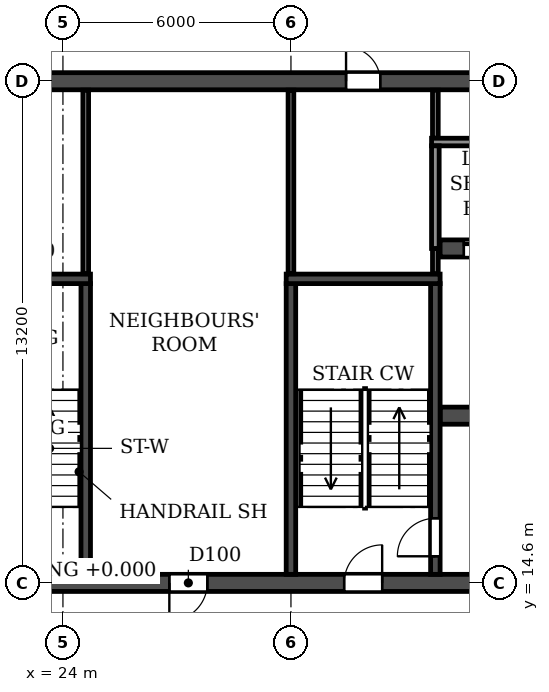
"""IFC4 building model, lengths in metres.
Left out: names, types, materials, properties, quantities, classifications, styles, units other than length and angle.
Written with IfcOpenShell. Run it as: python <this file> out.ifc"""

import sys

from ifc_helpers import new_model, si_unit, direction, frame, frame_2d, origin, place, context, subcontext, project, spatial, rectangle, extrude, element, fill, save


model = new_model("IFC4")
c1 = context("Model", 3, precision=1e-05, world=origin(), true_north=direction((0.0, 1.0)))
c2 = subcontext(c1, "Body", "Model", "MODEL_VIEW")
j1 = project(units=[si_unit("LENGTHUNIT", "METRE"), si_unit("PLANEANGLEUNIT", "RADIAN")], contexts=[c1])
p1 = place(None, origin())
s1 = spatial("IfcSite", under=j1, at=p1, CompositionType="ELEMENT")
p2 = place(p1, origin())
s2 = spatial("IfcBuilding", under=s1, at=p2, CompositionType="ELEMENT")
p3 = place(p2, frame((0.0, 0.0, 122.4)))
s3 = spatial("IfcBuildingStorey", under=s2, at=p3, CompositionType="ELEMENT", Elevation=122.4)
p4 = place(p3, frame((12.2, 14.6, 0.0), z_axis=(0.0, 0.0, 1.0), x_axis=(1.0, 0.0, 0.0)))
e1 = element("IfcWall", 1, at=p4, inside=s3, PredefinedType="SOLIDWALL", context=c2, shape_type="SweptSolid", body=[
    extrude(rectangle(XDim=77.6, YDim=0.45, at=frame_2d((38.8, 0.0))), origin(), (0.0, 0.0, 1.0), 3.07),
])
p5 = place(p4, frame((0.8, 0.0, 0.0)))
e2 = element("IfcOpeningElement", 2, at=p5, cuts=e1, PredefinedType="OPENING", context=c2, shape_type="SweptSolid", body=[
    extrude(rectangle(XDim=1.0, YDim=2.1, at=frame_2d((0.5, 1.05))), frame((0.0, 0.235, 0.0), z_axis=(0.0, -1.0, 0.0), x_axis=(1.0, 0.0, 0.0)), (0.0, 0.0, 1.0), 0.47),
])
p6 = place(p4, frame((3.8, 0.0, 0.0)))
e3 = element("IfcOpeningElement", 3, at=p6, cuts=e1, PredefinedType="OPENING", context=c2, shape_type="SweptSolid", body=[
    extrude(rectangle(XDim=1.0, YDim=2.1, at=frame_2d((0.5, 1.05))), frame((0.0, 0.235, 0.0), z_axis=(0.0, -1.0, 0.0), x_axis=(1.0, 0.0, 0.0)), (0.0, 0.0, 1.0), 0.47),
])
p7 = place(p4, frame((6.7, 0.0, 0.0)))
e4 = element("IfcOpeningElement", 4, at=p7, cuts=e1, PredefinedType="OPENING", context=c2, shape_type="SweptSolid", body=[
    extrude(rectangle(XDim=1.0, YDim=2.1, at=frame_2d((0.5, 1.05))), frame((0.0, 0.235, 0.0), z_axis=(0.0, -1.0, 0.0), x_axis=(1.0, 0.0, 0.0)), (0.0, 0.0, 1.0), 0.47),
])
p8 = place(p4, frame((14.6, 0.0, 0.0)))
e5 = element("IfcOpeningElement", 5, at=p8, cuts=e1, PredefinedType="OPENING", context=c2, shape_type="SweptSolid", body=[
    extrude(rectangle(XDim=1.0, YDim=2.1, at=frame_2d((0.5, 1.05))), frame((0.0, 0.235, 0.0), z_axis=(0.0, -1.0, 0.0), x_axis=(1.0, 0.0, 0.0)), (0.0, 0.0, 1.0), 0.47),
])
p9 = place(p4, frame((19.2, 0.0, 0.0)))
e6 = element("IfcOpeningElement", 6, at=p9, cuts=e1, PredefinedType="OPENING", context=c2, shape_type="SweptSolid", body=[
    extrude(rectangle(XDim=1.0, YDim=2.1, at=frame_2d((0.5, 1.05))), frame((0.0, 0.235, 0.0), z_axis=(0.0, -1.0, 0.0), x_axis=(1.0, 0.0, 0.0)), (0.0, 0.0, 1.0), 0.47),
])
p10 = place(p4, frame((30.5, 0.0, 0.0)))
e7 = element("IfcOpeningElement", 7, at=p10, cuts=e1, PredefinedType="OPENING", context=c2, shape_type="SweptSolid", body=[
    extrude(rectangle(XDim=1.0, YDim=2.1, at=frame_2d((0.5, 1.05))), frame((0.0, 0.235, 0.0), z_axis=(0.0, -1.0, 0.0), x_axis=(1.0, 0.0, 0.0)), (0.0, 0.0, 1.0), 0.47),
])
p11 = place(p4, frame((34.4, 0.0, 0.0)))
e8 = element("IfcOpeningElement", 8, at=p11, cuts=e1, PredefinedType="OPENING", context=c2, shape_type="SweptSolid", body=[
    extrude(rectangle(XDim=1.0, YDim=2.1, at=frame_2d((0.5, 1.05))), frame((0.0, 0.235, 0.0), z_axis=(0.0, -1.0, 0.0), x_axis=(1.0, 0.0, 0.0)), (0.0, 0.0, 1.0), 0.47),
])
p12 = place(p4, frame((38.3, 0.0, 0.0)))
e9 = element("IfcOpeningElement", 9, at=p12, cuts=e1, PredefinedType="OPENING", context=c2, shape_type="SweptSolid", body=[
    extrude(rectangle(XDim=1.0, YDim=2.1, at=frame_2d((0.5, 1.05))), frame((0.0, 0.235, 0.0), z_axis=(0.0, -1.0, 0.0), x_axis=(1.0, 0.0, 0.0)), (0.0, 0.0, 1.0), 0.47),
])
p13 = place(p4, frame((40.9, 0.0, 0.0)))
e10 = element("IfcOpeningElement", 10, at=p13, cuts=e1, PredefinedType="OPENING", context=c2, shape_type="SweptSolid", body=[
    extrude(rectangle(XDim=1.0, YDim=2.1, at=frame_2d((0.5, 1.05))), frame((0.0, 0.235, 0.0), z_axis=(0.0, -1.0, 0.0), x_axis=(1.0, 0.0, 0.0)), (0.0, 0.0, 1.0), 0.47),
])
p14 = place(p4, frame((44.8, 0.0, 0.0)))
e11 = element("IfcOpeningElement", 11, at=p14, cuts=e1, PredefinedType="OPENING", context=c2, shape_type="SweptSolid", body=[
    extrude(rectangle(XDim=1.0, YDim=2.1, at=frame_2d((0.5, 1.05))), frame((0.0, 0.235, 0.0), z_axis=(0.0, -1.0, 0.0), x_axis=(1.0, 0.0, 0.0)), (0.0, 0.0, 1.0), 0.47),
])
p15 = place(p4, frame((57.4, 0.0, 0.0)))
e12 = element("IfcOpeningElement", 12, at=p15, cuts=e1, PredefinedType="OPENING", context=c2, shape_type="SweptSolid", body=[
    extrude(rectangle(XDim=1.0, YDim=2.1, at=frame_2d((0.5, 1.05))), frame((0.0, 0.235, 0.0), z_axis=(0.0, -1.0, 0.0), x_axis=(1.0, 0.0, 0.0)), (0.0, 0.0, 1.0), 0.47),
])
p16 = place(p4, frame((62.0, 0.0, 0.0)))
e13 = element("IfcOpeningElement", 13, at=p16, cuts=e1, PredefinedType="OPENING", context=c2, shape_type="SweptSolid", body=[
    extrude(rectangle(XDim=1.0, YDim=2.1, at=frame_2d((0.5, 1.05))), frame((0.0, 0.235, 0.0), z_axis=(0.0, -1.0, 0.0), x_axis=(1.0, 0.0, 0.0)), (0.0, 0.0, 1.0), 0.47),
])
p17 = place(p4, frame((69.9, 0.0, 0.0)))
e14 = element("IfcOpeningElement", 14, at=p17, cuts=e1, PredefinedType="OPENING", context=c2, shape_type="SweptSolid", body=[
    extrude(rectangle(XDim=1.0, YDim=2.1, at=frame_2d((0.5, 1.05))), frame((0.0, 0.235, 0.0), z_axis=(0.0, -1.0, 0.0), x_axis=(1.0, 0.0, 0.0)), (0.0, 0.0, 1.0), 0.47),
])
p18 = place(p4, frame((72.8, 0.0, 0.0)))
e15 = element("IfcOpeningElement", 15, at=p18, cuts=e1, PredefinedType="OPENING", context=c2, shape_type="SweptSolid", body=[
    extrude(rectangle(XDim=1.0, YDim=2.1, at=frame_2d((0.5, 1.05))), frame((0.0, 0.235, 0.0), z_axis=(0.0, -1.0, 0.0), x_axis=(1.0, 0.0, 0.0)), (0.0, 0.0, 1.0), 0.47),
])
p19 = place(p4, frame((75.8, 0.0, 0.0)))
e16 = element("IfcOpeningElement", 16, at=p19, cuts=e1, PredefinedType="OPENING", context=c2, shape_type="SweptSolid", body=[
    extrude(rectangle(XDim=1.0, YDim=2.1, at=frame_2d((0.5, 1.05))), frame((0.0, 0.235, 0.0), z_axis=(0.0, -1.0, 0.0), x_axis=(1.0, 0.0, 0.0)), (0.0, 0.0, 1.0), 0.47),
])
p20 = place(p3, frame((12.2, 27.8, 0.0), z_axis=(0.0, 0.0, 1.0), x_axis=(1.0, 0.0, 0.0)))
e17 = element("IfcWall", 17, at=p20, inside=s3, PredefinedType="SOLIDWALL", context=c2, shape_type="SweptSolid", body=[
    extrude(rectangle(XDim=77.6, YDim=0.45, at=frame_2d((38.8, 0.0))), origin(), (0.0, 0.0, 1.0), 3.07),
])
p21 = place(p20, frame((0.8, 0.0, 0.0)))
e18 = element("IfcOpeningElement", 18, at=p21, cuts=e17, PredefinedType="OPENING", context=c2, shape_type="SweptSolid", body=[
    extrude(rectangle(XDim=1.0, YDim=2.1, at=frame_2d((0.5, 1.05))), frame((0.0, 0.235, 0.0), z_axis=(0.0, -1.0, 0.0), x_axis=(1.0, 0.0, 0.0)), (0.0, 0.0, 1.0), 0.47),
])
p22 = place(p20, frame((3.8, 0.0, 0.0)))
e19 = element("IfcOpeningElement", 19, at=p22, cuts=e17, PredefinedType="OPENING", context=c2, shape_type="SweptSolid", body=[
    extrude(rectangle(XDim=1.0, YDim=2.1, at=frame_2d((0.5, 1.05))), frame((0.0, 0.235, 0.0), z_axis=(0.0, -1.0, 0.0), x_axis=(1.0, 0.0, 0.0)), (0.0, 0.0, 1.0), 0.47),
])
p23 = place(p20, frame((6.7, 0.0, 0.0)))
e20 = element("IfcOpeningElement", 20, at=p23, cuts=e17, PredefinedType="OPENING", context=c2, shape_type="SweptSolid", body=[
    extrude(rectangle(XDim=1.0, YDim=2.1, at=frame_2d((0.5, 1.05))), frame((0.0, 0.235, 0.0), z_axis=(0.0, -1.0, 0.0), x_axis=(1.0, 0.0, 0.0)), (0.0, 0.0, 1.0), 0.47),
])
p24 = place(p20, frame((10.05, 0.0, 0.0)))
e21 = element("IfcOpeningElement", 21, at=p24, cuts=e17, PredefinedType="OPENING", context=c2, shape_type="SweptSolid", body=[
    extrude(rectangle(XDim=0.9, YDim=2.1, at=frame_2d((0.45, 1.05))), frame((0.0, 0.235, 0.0), z_axis=(0.0, -1.0, 0.0), x_axis=(1.0, 0.0, 0.0)), (0.0, 0.0, 1.0), 0.47),
])
p25 = place(p20, frame((19.25, 0.0, 0.0)))
e22 = element("IfcOpeningElement", 22, at=p25, cuts=e17, PredefinedType="OPENING", context=c2, shape_type="SweptSolid", body=[
    extrude(rectangle(XDim=0.9, YDim=2.1, at=frame_2d((0.45, 1.05))), frame((0.0, 0.235, 0.0), z_axis=(0.0, -1.0, 0.0), x_axis=(1.0, 0.0, 0.0)), (0.0, 0.0, 1.0), 0.47),
])
p26 = place(p20, frame((25.0, 0.0, 0.0)))
e23 = element("IfcOpeningElement", 23, at=p26, cuts=e17, PredefinedType="OPENING", context=c2, shape_type="SweptSolid", body=[
    extrude(rectangle(XDim=1.0, YDim=2.1, at=frame_2d((0.5, 1.05))), frame((0.0, 0.235, 0.0), z_axis=(0.0, -1.0, 0.0), x_axis=(1.0, 0.0, 0.0)), (0.0, 0.0, 1.0), 0.47),
])
p27 = place(p20, frame((30.2, 0.0, 0.0)))
e24 = element("IfcOpeningElement", 24, at=p27, cuts=e17, PredefinedType="OPENING", context=c2, shape_type="SweptSolid", body=[
    extrude(rectangle(XDim=1.0, YDim=2.1, at=frame_2d((0.5, 1.05))), frame((0.0, 0.235, 0.0), z_axis=(0.0, -1.0, 0.0), x_axis=(1.0, 0.0, 0.0)), (0.0, 0.0, 1.0), 0.47),
])
p28 = place(p20, frame((35.4, 0.0, 0.0)))
e25 = element("IfcOpeningElement", 25, at=p28, cuts=e17, PredefinedType="OPENING", context=c2, shape_type="SweptSolid", body=[
    extrude(rectangle(XDim=1.0, YDim=2.1, at=frame_2d((0.5, 1.05))), frame((0.0, 0.235, 0.0), z_axis=(0.0, -1.0, 0.0), x_axis=(1.0, 0.0, 0.0)), (0.0, 0.0, 1.0), 0.47),
])
p29 = place(p20, frame((38.3, 0.0, 0.0)))
e26 = element("IfcOpeningElement", 26, at=p29, cuts=e17, PredefinedType="OPENING", context=c2, shape_type="SweptSolid", body=[
    extrude(rectangle(XDim=1.0, YDim=2.1, at=frame_2d((0.5, 1.05))), frame((0.0, 0.235, 0.0), z_axis=(0.0, -1.0, 0.0), x_axis=(1.0, 0.0, 0.0)), (0.0, 0.0, 1.0), 0.47),
])
p30 = place(p20, frame((41.2, 0.0, 0.0)))
e27 = element("IfcOpeningElement", 27, at=p30, cuts=e17, PredefinedType="OPENING", context=c2, shape_type="SweptSolid", body=[
    extrude(rectangle(XDim=1.0, YDim=2.1, at=frame_2d((0.5, 1.05))), frame((0.0, 0.235, 0.0), z_axis=(0.0, -1.0, 0.0), x_axis=(1.0, 0.0, 0.0)), (0.0, 0.0, 1.0), 0.47),
])
p31 = place(p20, frame((46.4, 0.0, 0.0)))
e28 = element("IfcOpeningElement", 28, at=p31, cuts=e17, PredefinedType="OPENING", context=c2, shape_type="SweptSolid", body=[
    extrude(rectangle(XDim=1.0, YDim=2.1, at=frame_2d((0.5, 1.05))), frame((0.0, 0.235, 0.0), z_axis=(0.0, -1.0, 0.0), x_axis=(1.0, 0.0, 0.0)), (0.0, 0.0, 1.0), 0.47),
])
p32 = place(p20, frame((51.6, 0.0, 0.0)))
e29 = element("IfcOpeningElement", 29, at=p32, cuts=e17, PredefinedType="OPENING", context=c2, shape_type="SweptSolid", body=[
    extrude(rectangle(XDim=1.0, YDim=2.1, at=frame_2d((0.5, 1.05))), frame((0.0, 0.235, 0.0), z_axis=(0.0, -1.0, 0.0), x_axis=(1.0, 0.0, 0.0)), (0.0, 0.0, 1.0), 0.47),
])
p33 = place(p20, frame((54.2, 0.0, 0.0)))
e30 = element("IfcOpeningElement", 30, at=p33, cuts=e17, PredefinedType="OPENING", context=c2, shape_type="SweptSolid", body=[
    extrude(rectangle(XDim=1.0, YDim=2.1, at=frame_2d((0.5, 1.05))), frame((0.0, 0.235, 0.0), z_axis=(0.0, -1.0, 0.0), x_axis=(1.0, 0.0, 0.0)), (0.0, 0.0, 1.0), 0.47),
])
p34 = place(p20, frame((57.45, 0.0, 0.0)))
e31 = element("IfcOpeningElement", 31, at=p34, cuts=e17, PredefinedType="OPENING", context=c2, shape_type="SweptSolid", body=[
    extrude(rectangle(XDim=0.9, YDim=2.1, at=frame_2d((0.45, 1.05))), frame((0.0, 0.235, 0.0), z_axis=(0.0, -1.0, 0.0), x_axis=(1.0, 0.0, 0.0)), (0.0, 0.0, 1.0), 0.47),
])
p35 = place(p20, frame((66.65, 0.0, 0.0)))
e32 = element("IfcOpeningElement", 32, at=p35, cuts=e17, PredefinedType="OPENING", context=c2, shape_type="SweptSolid", body=[
    extrude(rectangle(XDim=0.9, YDim=2.1, at=frame_2d((0.45, 1.05))), frame((0.0, 0.235, 0.0), z_axis=(0.0, -1.0, 0.0), x_axis=(1.0, 0.0, 0.0)), (0.0, 0.0, 1.0), 0.47),
])
p36 = place(p20, frame((69.9, 0.0, 0.0)))
e33 = element("IfcOpeningElement", 33, at=p36, cuts=e17, PredefinedType="OPENING", context=c2, shape_type="SweptSolid", body=[
    extrude(rectangle(XDim=1.0, YDim=2.1, at=frame_2d((0.5, 1.05))), frame((0.0, 0.235, 0.0), z_axis=(0.0, -1.0, 0.0), x_axis=(1.0, 0.0, 0.0)), (0.0, 0.0, 1.0), 0.47),
])
p37 = place(p20, frame((72.8, 0.0, 0.0)))
e34 = element("IfcOpeningElement", 34, at=p37, cuts=e17, PredefinedType="OPENING", context=c2, shape_type="SweptSolid", body=[
    extrude(rectangle(XDim=1.0, YDim=2.1, at=frame_2d((0.5, 1.05))), frame((0.0, 0.235, 0.0), z_axis=(0.0, -1.0, 0.0), x_axis=(1.0, 0.0, 0.0)), (0.0, 0.0, 1.0), 0.47),
])
p38 = place(p20, frame((75.8, 0.0, 0.0)))
e35 = element("IfcOpeningElement", 35, at=p38, cuts=e17, PredefinedType="OPENING", context=c2, shape_type="SweptSolid", body=[
    extrude(rectangle(XDim=1.0, YDim=2.1, at=frame_2d((0.5, 1.05))), frame((0.0, 0.235, 0.0), z_axis=(0.0, -1.0, 0.0), x_axis=(1.0, 0.0, 0.0)), (0.0, 0.0, 1.0), 0.47),
])
p39 = place(p3, frame((33.925, 19.0, 0.0), z_axis=(0.0, 0.0, 1.0), x_axis=(1.0, 0.0, 0.0)))
e36 = element("IfcWall", 36, at=p39, inside=s3, PredefinedType="SOLIDWALL", context=c2, shape_type="SweptSolid", body=[
    extrude(rectangle(XDim=34.15, YDim=0.45, at=frame_2d((17.075, 0.0))), origin(), (0.0, 0.0, 1.0), 3.07),
])
p40 = place(p39, frame((16.175, 0.0, 0.0)))
e37 = element("IfcOpeningElement", 37, at=p40, cuts=e36, PredefinedType="OPENING", context=c2, shape_type="SweptSolid", body=[
    extrude(rectangle(XDim=1.8, YDim=2.1, at=frame_2d((0.9, 1.05))), frame((0.0, 0.235, 0.0), z_axis=(0.0, -1.0, 0.0), x_axis=(1.0, 0.0, 0.0)), (0.0, 0.0, 1.0), 0.47),
])
p41 = place(p39, frame((1.525, 0.0, 0.0)))
e38 = element("IfcOpeningElement", 38, at=p41, cuts=e36, PredefinedType="OPENING", context=c2, shape_type="SweptSolid", body=[
    extrude(rectangle(XDim=1.8, YDim=2.1, at=frame_2d((0.9, 1.05))), frame((0.0, 0.235, 0.0), z_axis=(0.0, -1.0, 0.0), x_axis=(1.0, 0.0, 0.0)), (0.0, 0.0, 1.0), 0.47),
])
p42 = place(p39, frame((30.825, 0.0, 0.0)))
e39 = element("IfcOpeningElement", 39, at=p42, cuts=e36, PredefinedType="OPENING", context=c2, shape_type="SweptSolid", body=[
    extrude(rectangle(XDim=1.8, YDim=2.1, at=frame_2d((0.9, 1.05))), frame((0.0, 0.235, 0.0), z_axis=(0.0, -1.0, 0.0), x_axis=(1.0, 0.0, 0.0)), (0.0, 0.0, 1.0), 0.47),
])
p43 = place(p3, frame((33.925, 23.4, 0.0), z_axis=(0.0, 0.0, 1.0), x_axis=(1.0, 0.0, 0.0)))
e40 = element("IfcWall", 40, at=p43, inside=s3, PredefinedType="SOLIDWALL", context=c2, shape_type="SweptSolid", body=[
    extrude(rectangle(XDim=34.15, YDim=0.45, at=frame_2d((17.075, 0.0))), origin(), (0.0, 0.0, 1.0), 3.07),
])
p44 = place(p43, frame((16.175, 0.0, 0.0)))
e41 = element("IfcOpeningElement", 41, at=p44, cuts=e40, PredefinedType="OPENING", context=c2, shape_type="SweptSolid", body=[
    extrude(rectangle(XDim=1.8, YDim=2.1, at=frame_2d((0.9, 1.05))), frame((0.0, 0.235, 0.0), z_axis=(0.0, -1.0, 0.0), x_axis=(1.0, 0.0, 0.0)), (0.0, 0.0, 1.0), 0.47),
])
p45 = place(p43, frame((0.625, 0.0, 0.0)))
e42 = element("IfcOpeningElement", 42, at=p45, cuts=e40, PredefinedType="OPENING", context=c2, shape_type="SweptSolid", body=[
    extrude(rectangle(XDim=1.1, YDim=2.1, at=frame_2d((0.55, 1.05))), frame((0.0, 0.235, 0.0), z_axis=(0.0, -1.0, 0.0), x_axis=(1.0, 0.0, 0.0)), (0.0, 0.0, 1.0), 0.47),
])
p46 = place(p43, frame((3.225, 0.0, 0.0)))
e43 = element("IfcOpeningElement", 43, at=p46, cuts=e40, PredefinedType="OPENING", context=c2, shape_type="SweptSolid", body=[
    extrude(rectangle(XDim=1.1, YDim=2.1, at=frame_2d((0.55, 1.05))), frame((0.0, 0.235, 0.0), z_axis=(0.0, -1.0, 0.0), x_axis=(1.0, 0.0, 0.0)), (0.0, 0.0, 1.0), 0.47),
])
p47 = place(p43, frame((5.825, 0.0, 0.0)))
e44 = element("IfcOpeningElement", 44, at=p47, cuts=e40, PredefinedType="OPENING", context=c2, shape_type="SweptSolid", body=[
    extrude(rectangle(XDim=1.1, YDim=2.1, at=frame_2d((0.55, 1.05))), frame((0.0, 0.235, 0.0), z_axis=(0.0, -1.0, 0.0), x_axis=(1.0, 0.0, 0.0)), (0.0, 0.0, 1.0), 0.47),
])
p48 = place(p43, frame((8.425, 0.0, 0.0)))
e45 = element("IfcOpeningElement", 45, at=p48, cuts=e40, PredefinedType="OPENING", context=c2, shape_type="SweptSolid", body=[
    extrude(rectangle(XDim=1.1, YDim=2.1, at=frame_2d((0.55, 1.05))), frame((0.0, 0.235, 0.0), z_axis=(0.0, -1.0, 0.0), x_axis=(1.0, 0.0, 0.0)), (0.0, 0.0, 1.0), 0.47),
])
p49 = place(p43, frame((11.025, 0.0, 0.0)))
e46 = element("IfcOpeningElement", 46, at=p49, cuts=e40, PredefinedType="OPENING", context=c2, shape_type="SweptSolid", body=[
    extrude(rectangle(XDim=1.1, YDim=2.1, at=frame_2d((0.55, 1.05))), frame((0.0, 0.235, 0.0), z_axis=(0.0, -1.0, 0.0), x_axis=(1.0, 0.0, 0.0)), (0.0, 0.0, 1.0), 0.47),
])
p50 = place(p43, frame((13.625, 0.0, 0.0)))
e47 = element("IfcOpeningElement", 47, at=p50, cuts=e40, PredefinedType="OPENING", context=c2, shape_type="SweptSolid", body=[
    extrude(rectangle(XDim=1.1, YDim=2.1, at=frame_2d((0.55, 1.05))), frame((0.0, 0.235, 0.0), z_axis=(0.0, -1.0, 0.0), x_axis=(1.0, 0.0, 0.0)), (0.0, 0.0, 1.0), 0.47),
])
p51 = place(p43, frame((27.225, 0.0, 0.0)))
e48 = element("IfcOpeningElement", 48, at=p51, cuts=e40, PredefinedType="OPENING", context=c2, shape_type="SweptSolid", body=[
    extrude(rectangle(XDim=1.1, YDim=2.1, at=frame_2d((0.55, 1.05))), frame((0.0, 0.235, 0.0), z_axis=(0.0, -1.0, 0.0), x_axis=(1.0, 0.0, 0.0)), (0.0, 0.0, 1.0), 0.47),
])
p52 = place(p3, frame((30.0, 14.825, 0.0), z_axis=(0.0, 0.0, 1.0), x_axis=(0.0, 1.0, 0.0)))
e49 = element("IfcWall", 49, at=p52, inside=s3, PredefinedType="SOLIDWALL", context=c2, shape_type="SweptSolid", body=[
    extrude(rectangle(XDim=7.65, YDim=0.25, at=frame_2d((3.825, 0.0))), origin(), (0.0, 0.0, 1.0), 3.07),
])
p53 = place(p3, frame((33.8, 14.825, 0.0), z_axis=(0.0, 0.0, 1.0), x_axis=(0.0, 1.0, 0.0)))
e50 = element("IfcWall", 50, at=p53, inside=s3, PredefinedType="SOLIDWALL", context=c2, shape_type="SweptSolid", body=[
    extrude(rectangle(XDim=7.65, YDim=0.25, at=frame_2d((3.825, 0.0))), origin(), (0.0, 0.0, 1.0), 3.07),
])
p54 = place(p53, frame((0.475, 0.0, 0.0)))
e51 = element("IfcOpeningElement", 51, at=p54, cuts=e50, PredefinedType="OPENING", context=c2, shape_type="SweptSolid", body=[
    extrude(rectangle(XDim=1.0, YDim=2.1, at=frame_2d((0.5, 1.05))), frame((0.0, 0.135, 0.0), z_axis=(0.0, -1.0, 0.0), x_axis=(1.0, 0.0, 0.0)), (0.0, 0.0, 1.0), 0.27),
])
p55 = place(p3, frame((29.875, 22.6, 0.0), z_axis=(0.0, 0.0, 1.0), x_axis=(1.0, 0.0, 0.0)))
e52 = element("IfcWall", 52, at=p55, inside=s3, PredefinedType="SOLIDWALL", context=c2, shape_type="SweptSolid", body=[
    extrude(rectangle(XDim=4.05, YDim=0.25, at=frame_2d((2.025, 0.0))), origin(), (0.0, 0.0, 1.0), 3.07),
])
p56 = place(p3, frame((24.6, 14.825, 0.0), z_axis=(0.0, 0.0, 1.0), x_axis=(0.0, 1.0, 0.0)))
e53 = element("IfcWall", 53, at=p56, inside=s3, PredefinedType="SOLIDWALL", context=c2, shape_type="SweptSolid", body=[
    extrude(rectangle(XDim=7.65, YDim=0.25, at=frame_2d((3.825, 0.0))), origin(), (0.0, 0.0, 1.0), 3.07),
])
p57 = place(p3, frame((20.675, 22.6, 0.0), z_axis=(0.0, 0.0, 1.0), x_axis=(1.0, 0.0, 0.0)))
e54 = element("IfcWall", 54, at=p57, inside=s3, PredefinedType="SOLIDWALL", context=c2, shape_type="SweptSolid", body=[
    extrude(rectangle(XDim=4.05, YDim=0.25, at=frame_2d((2.025, 0.0))), origin(), (0.0, 0.0, 1.0), 3.07),
])
for number, where, z_axis, x_axis in (
    (55, (24.6, 22.735, 0.0), (0.0, 0.0, 1.0), (0.0, 1.0, 0.0)),
    (56, (30.0, 22.735, 0.0), (0.0, 0.0, 1.0), (0.0, 1.0, 0.0)),
):
    element("IfcWall", number, at=place(p3, frame(where, z_axis=z_axis, x_axis=x_axis)), inside=s3, PredefinedType="PARTITIONING", context=c2, shape_type="SweptSolid", body=[
        extrude(rectangle(XDim=4.83, YDim=0.15, at=frame_2d((2.415, 0.0))), origin(), (0.0, 0.0, 1.0), 3.07),
    ])
p58 = place(p3, frame((33.8, 22.735, 0.0), z_axis=(0.0, 0.0, 1.0), x_axis=(0.0, 1.0, 0.0)))
e57 = element("IfcWall", 57, at=p58, inside=s3, PredefinedType="PARTITIONING", context=c2, shape_type="SweptSolid", body=[
    extrude(rectangle(XDim=0.665, YDim=0.15, at=frame_2d((0.333, 0.0))), origin(), (0.0, 0.0, 1.0), 3.07),
])
p59 = place(p3, frame((33.8, 26.3, 0.0), z_axis=(0.0, 0.0, 1.0), x_axis=(0.0, 1.0, 0.0)))
e58 = element("IfcWall", 58, at=p59, inside=s3, PredefinedType="PARTITIONING", context=c2, shape_type="SweptSolid", body=[
    extrude(rectangle(XDim=1.265, YDim=0.15, at=frame_2d((0.632, 0.0))), origin(), (0.0, 0.0, 1.0), 3.07),
])
p60 = place(p3, frame((33.7, 26.2, 0.0), z_axis=(0.0, 0.0, 1.0), x_axis=(1.0, 0.0, 0.0)))
e59 = element("IfcWall", 59, at=p60, inside=s3, PredefinedType="PARTITIONING", context=c2, shape_type="SweptSolid", body=[
    extrude(rectangle(XDim=10.4, YDim=0.2, at=frame_2d((5.2, 0.0))), origin(), (0.0, 0.0, 1.0), 3.07),
])
p61 = place(p3, frame((33.8, 23.4, 0.0), z_axis=(0.0, 0.0, 1.0), x_axis=(0.0, 1.0, 0.0)))
e60 = element("IfcWall", 60, at=p61, inside=s3, PredefinedType="PARTITIONING", context=c2, shape_type="SweptSolid", body=[
    extrude(rectangle(XDim=2.7, YDim=0.2, at=frame_2d((1.35, 0.0))), origin(), (0.0, 0.0, 1.0), 3.07),
])
p62 = place(p25, origin())
e61 = element("IfcDoor", 61, at=p62, inside=s3, OperationType="SINGLE_SWING_LEFT", PredefinedType="DOOR", context=c2, shape_type="SweptSolid", body=[
    extrude(rectangle(XDim=0.9, YDim=2.1, at=frame_2d((0.45, 1.05))), frame((0.0, 0.025, 0.0), z_axis=(0.0, -1.0, 0.0), x_axis=(1.0, 0.0, 0.0)), (0.0, 0.0, 1.0), 0.05),
])
fill(e22, e61)
p63 = place(p8, frame((1.0, 0.0, 0.0), z_axis=(0.0, 0.0, 1.0), x_axis=(-1.0, 0.0, 0.0)))
e62 = element("IfcDoor", 62, at=p63, inside=s3, OperationType="SINGLE_SWING_RIGHT", PredefinedType="DOOR", context=c2, shape_type="SweptSolid", body=[
    extrude(rectangle(XDim=1.0, YDim=2.1, at=frame_2d((0.5, 1.05))), frame((0.0, 0.025, 0.0), z_axis=(0.0, -1.0, 0.0), x_axis=(1.0, 0.0, 0.0)), (0.0, 0.0, 1.0), 0.05),
])
fill(e5, e62)
p64 = place(p9, origin())
e63 = element("IfcDoor", 63, at=p64, inside=s3, OperationType="SINGLE_SWING_RIGHT", PredefinedType="DOOR", context=c2, shape_type="SweptSolid", body=[
    extrude(rectangle(XDim=1.0, YDim=2.1, at=frame_2d((0.5, 1.05))), frame((0.0, 0.025, 0.0), z_axis=(0.0, -1.0, 0.0), x_axis=(1.0, 0.0, 0.0)), (0.0, 0.0, 1.0), 0.05),
])
fill(e6, e63)
p65 = place(p54, origin())
e64 = element("IfcDoor", 64, at=p65, inside=s3, OperationType="SINGLE_SWING_LEFT", PredefinedType="DOOR", context=c2, shape_type="SweptSolid", body=[
    extrude(rectangle(XDim=1.0, YDim=2.1, at=frame_2d((0.5, 1.05))), frame((0.0, 0.025, 0.0), z_axis=(0.0, -1.0, 0.0), x_axis=(1.0, 0.0, 0.0)), (0.0, 0.0, 1.0), 0.05),
])
fill(e51, e64)
p66 = place(p45, origin())
e65 = element("IfcDoor", 65, at=p66, inside=s3, OperationType="DOUBLE_DOOR_SLIDING", PredefinedType="DOOR", context=c2, shape_type="SweptSolid", body=[
    extrude(rectangle(XDim=1.1, YDim=2.1, at=frame_2d((0.55, 1.05))), frame((0.0, 0.025, 0.0), z_axis=(0.0, -1.0, 0.0), x_axis=(1.0, 0.0, 0.0)), (0.0, 0.0, 1.0), 0.05),
])
fill(e42, e65)
save(model, sys.argv[1])
